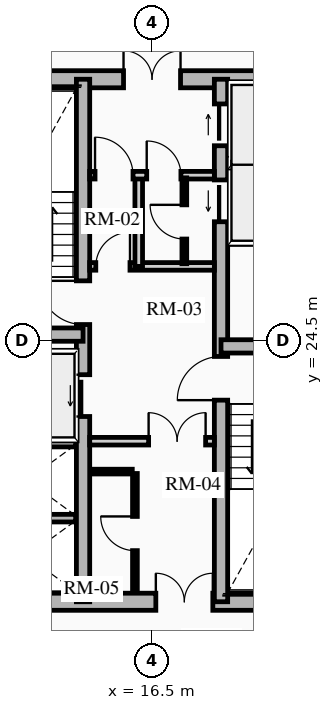
"""IFC4 building model, lengths in metres.
Left out: names, types, materials, properties, quantities, classifications, styles, units other than length and angle.
Written with IfcOpenShell. Run it as: python <this file> out.ifc"""

import sys

from ifc_helpers import new_model, si_unit, direction, frame, frame_2d, origin, place, context, subcontext, project, spatial, rectangle, extrude, source, transform, mapped, element, fill, save


model = new_model("IFC4")
c1 = context("Model", 3, precision=1e-05, world=origin(), true_north=direction((0.0, 1.0)))
c2 = subcontext(c1, "Body", "Model", "MODEL_VIEW")
j1 = project(units=[si_unit("LENGTHUNIT", "METRE"), si_unit("PLANEANGLEUNIT", "RADIAN")], contexts=[c1])
p1 = place(None, origin())
s1 = spatial("IfcSite", under=j1, at=p1, CompositionType="ELEMENT")
p2 = place(p1, origin())
s2 = spatial("IfcBuilding", under=s1, at=p2, CompositionType="ELEMENT")
p3 = place(p2, frame((0.0, 0.0, 102.16)))
s3 = spatial("IfcBuildingStorey", under=s2, at=p3, CompositionType="ELEMENT", Elevation=102.16)
p4 = place(p3, frame((11.15, 17.625, 0.0), z_axis=(0.0, 0.0, 1.0), x_axis=(1.0, 0.0, 0.0)))
e1 = element("IfcWall", 1, at=p4, inside=s3, PredefinedType="SHEAR", context=c2, shape_type="SweptSolid", body=[
    extrude(rectangle(XDim=10.7, YDim=0.45, at=frame_2d((5.35, 0.0))), origin(), (0.0, 0.0, 1.0), 2.91),
])
m1 = source(origin(), c2, "Body", "SweptSolid", [
    extrude(rectangle(XDim=1.5, YDim=2.02, at=frame_2d((0.75, 1.01))), frame((0.0, 0.235, 0.0), z_axis=(0.0, -1.0, 0.0), x_axis=(1.0, 0.0, 0.0)), (0.0, 0.0, 1.0), 0.47),
])
p5 = place(p4, frame((5.45, 0.0, 0.0)))
e2 = element("IfcOpeningElement", 2, at=p5, cuts=e1, PredefinedType="OPENING", context=c2, shape_type="MappedRepresentation", body=[
    mapped(m1, transform((0.0, 0.0, 0.0), x_axis=(1.0, 0.0, 0.0), y_axis=(0.0, 1.0, 0.0), z_axis=(0.0, 0.0, 1.0), scale=1.0)),
])
p6 = place(p3, frame((11.15, 31.375, 0.0), z_axis=(0.0, 0.0, 1.0), x_axis=(1.0, 0.0, 0.0)))
e3 = element("IfcWall", 3, at=p6, inside=s3, PredefinedType="SHEAR", context=c2, shape_type="SweptSolid", body=[
    extrude(rectangle(XDim=10.7, YDim=0.45, at=frame_2d((5.35, 0.0))), origin(), (0.0, 0.0, 1.0), 2.91),
])
p7 = place(p6, frame((4.6, 0.0, 0.0)))
e4 = element("IfcOpeningElement", 4, at=p7, cuts=e3, PredefinedType="OPENING", context=c2, shape_type="MappedRepresentation", body=[
    mapped(m1, transform((0.0, 0.0, 0.0), x_axis=(1.0, 0.0, 0.0), y_axis=(0.0, 1.0, 0.0), z_axis=(0.0, 0.0, 1.0), scale=1.0)),
])
p8 = place(p3, frame((14.685, 17.625, 0.0), z_axis=(0.0, 0.0, 1.0), x_axis=(0.0, 1.0, 0.0)))
e5 = element("IfcWall", 5, at=p8, inside=s3, PredefinedType="SHEAR", context=c2, shape_type="SweptSolid", body=[
    extrude(rectangle(XDim=13.75, YDim=0.35, at=frame_2d((6.875, 0.0))), origin(), (0.0, 0.0, 1.0), 2.91),
])
m2 = source(origin(), c2, "Body", "SweptSolid", [
    extrude(rectangle(XDim=1.1, YDim=2.015, at=frame_2d((0.55, 1.007))), frame((0.0, 0.185, 0.0), z_axis=(0.0, -1.0, 0.0), x_axis=(1.0, 0.0, 0.0)), (0.0, 0.0, 1.0), 0.37),
])
p9 = place(p8, frame((4.875, 0.0, 0.0)))
e6 = element("IfcOpeningElement", 6, at=p9, cuts=e5, PredefinedType="OPENING", context=c2, shape_type="MappedRepresentation", body=[
    mapped(m2, transform((0.0, 0.0, 0.0), x_axis=(1.0, 0.0, 0.0), y_axis=(0.0, 1.0, 0.0), z_axis=(0.0, 0.0, 1.0), scale=1.0)),
])
m3 = source(origin(), c2, "Body", "SweptSolid", [
    extrude(rectangle(XDim=1.15, YDim=2.02, at=frame_2d((0.575, 1.01))), frame((0.0, 0.185, 0.0), z_axis=(0.0, -1.0, 0.0), x_axis=(1.0, 0.0, 0.0)), (0.0, 0.0, 1.0), 0.37),
])
p10 = place(p8, frame((7.295, 0.0, 0.0)))
e7 = element("IfcOpeningElement", 7, at=p10, cuts=e5, PredefinedType="OPENING", context=c2, shape_type="MappedRepresentation", body=[
    mapped(m3, transform((0.0, 0.0, 0.0), x_axis=(1.0, 0.0, 0.0), y_axis=(0.0, 1.0, 0.0), z_axis=(0.0, 0.0, 1.0), scale=1.0)),
])
p11 = place(p3, frame((18.315, 17.625, 0.0), z_axis=(0.0, 0.0, 1.0), x_axis=(0.0, 1.0, 0.0)))
e8 = element("IfcWall", 8, at=p11, inside=s3, PredefinedType="SHEAR", context=c2, shape_type="SweptSolid", body=[
    extrude(rectangle(XDim=13.75, YDim=0.35, at=frame_2d((6.875, 0.0))), origin(), (0.0, 0.0, 1.0), 2.91),
])
p12 = place(p11, frame((10.0, 0.0, 0.0)))
e9 = element("IfcOpeningElement", 9, at=p12, cuts=e8, PredefinedType="OPENING", context=c2, shape_type="MappedRepresentation", body=[
    mapped(m2, transform((0.0, 0.0, 0.0), x_axis=(1.0, 0.0, 0.0), y_axis=(0.0, 1.0, 0.0), z_axis=(0.0, 0.0, 1.0), scale=1.0)),
])
p13 = place(p11, frame((12.0, 0.0, 0.0)))
e10 = element("IfcOpeningElement", 10, at=p13, cuts=e8, PredefinedType="OPENING", context=c2, shape_type="MappedRepresentation", body=[
    mapped(m2, transform((0.0, 0.0, 0.0), x_axis=(1.0, 0.0, 0.0), y_axis=(0.0, 1.0, 0.0), z_axis=(0.0, 0.0, 1.0), scale=1.0)),
])
p14 = place(p11, frame((5.305, 0.0, 0.0)))
e11 = element("IfcOpeningElement", 11, at=p14, cuts=e8, PredefinedType="OPENING", context=c2, shape_type="MappedRepresentation", body=[
    mapped(m3, transform((0.0, 0.0, 0.0), x_axis=(1.0, 0.0, 0.0), y_axis=(0.0, 1.0, 0.0), z_axis=(0.0, 0.0, 1.0), scale=1.0)),
])
for number, where, z_axis, x_axis in (
    (12, (11.4, 24.655, 0.0), (0.0, 0.0, 1.0), (1.0, 0.0, 0.0)),
    (13, (18.315, 24.345, 0.0), (0.0, 0.0, 1.0), (1.0, 0.0, 0.0)),
):
    element("IfcWall", number, at=place(p3, frame(where, z_axis=z_axis, x_axis=x_axis)), inside=s3, PredefinedType="SHEAR", context=c2, shape_type="SweptSolid", body=[
        extrude(rectangle(XDim=3.285, YDim=0.35, at=frame_2d((1.643, 0.0))), origin(), (0.0, 0.0, 1.0), 2.91),
    ])
for number, where, z_axis, x_axis in (
    (14, (11.52, 21.8, 0.0), (0.0, 0.0, 1.0), (1.0, 0.0, 0.0)),
    (15, (11.52, 19.825, 0.0), (0.0, 0.0, 1.0), (1.0, 0.0, 0.0)),
    (16, (18.51, 27.13, 0.0), (0.0, 0.0, 1.0), (1.0, 0.0, 0.0)),
    (17, (18.51, 29.175, 0.0), (0.0, 0.0, 1.0), (1.0, 0.0, 0.0)),
):
    element("IfcWall", number, at=place(p3, frame(where, z_axis=z_axis, x_axis=x_axis)), inside=s3, PredefinedType="SHEAR", context=c2, shape_type="SweptSolid", body=[
        extrude(rectangle(XDim=2.97, YDim=0.2, at=frame_2d((1.485, 0.0))), origin(), (0.0, 0.0, 1.0), 2.91),
    ])
p15 = place(p3, frame((14.86, 21.85, 0.0), z_axis=(0.0, 0.0, 1.0), x_axis=(1.0, 0.0, 0.0)))
e18 = element("IfcWall", 18, at=p15, inside=s3, PredefinedType="PARTITIONING", context=c2, shape_type="SweptSolid", body=[
    extrude(rectangle(XDim=3.28, YDim=0.2, at=frame_2d((1.64, 0.0))), origin(), (0.0, 0.0, 1.0), 2.655),
])
m4 = source(origin(), c2, "Body", "SweptSolid", [
    extrude(rectangle(XDim=1.5, YDim=2.02, at=frame_2d((0.75, 1.01))), frame((0.0, 0.11, 0.0), z_axis=(0.0, -1.0, 0.0), x_axis=(1.0, 0.0, 0.0)), (0.0, 0.0, 1.0), 0.22),
])
p16 = place(p15, frame((1.55, 0.0, 0.0)))
e19 = element("IfcOpeningElement", 19, at=p16, cuts=e18, PredefinedType="OPENING", context=c2, shape_type="MappedRepresentation", body=[
    mapped(m4, transform((0.0, 0.0, 0.0), x_axis=(1.0, 0.0, 0.0), y_axis=(0.0, 1.0, 0.0), z_axis=(0.0, 0.0, 1.0), scale=1.0)),
])
p17 = place(p3, frame((14.86, 26.45, 0.0), z_axis=(0.0, 0.0, 1.0), x_axis=(1.0, 0.0, 0.0)))
e20 = element("IfcWall", 20, at=p17, inside=s3, PredefinedType="PARTITIONING", context=c2, shape_type="SweptSolid", body=[
    extrude(rectangle(XDim=3.28, YDim=0.2, at=frame_2d((1.64, 0.0))), origin(), (0.0, 0.0, 1.0), 2.655),
])
m5 = source(origin(), c2, "Body", "SweptSolid", [
    extrude(rectangle(XDim=0.9, YDim=2.005, at=frame_2d((0.45, 1.002))), frame((0.0, 0.11, 0.0), z_axis=(0.0, -1.0, 0.0), x_axis=(1.0, 0.0, 0.0)), (0.0, 0.0, 1.0), 0.22),
])
p18 = place(p17, frame((0.16, 0.0, 0.0)))
e21 = element("IfcOpeningElement", 21, at=p18, cuts=e20, PredefinedType="OPENING", context=c2, shape_type="MappedRepresentation", body=[
    mapped(m5, transform((0.0, 0.0, 0.0), x_axis=(1.0, 0.0, 0.0), y_axis=(0.0, 1.0, 0.0), z_axis=(0.0, 0.0, 1.0), scale=1.0)),
])
p19 = place(p3, frame((16.15, 26.45, 0.0), z_axis=(0.0, 0.0, 1.0), x_axis=(0.0, 1.0, 0.0)))
e22 = element("IfcWall", 22, at=p19, inside=s3, PredefinedType="PARTITIONING", context=c2, shape_type="SweptSolid", body=[
    extrude(rectangle(XDim=2.4, YDim=0.2, at=frame_2d((1.2, 0.0))), origin(), (0.0, 0.0, 1.0), 2.655),
])
p20 = place(p3, frame((14.86, 28.85, 0.0), z_axis=(0.0, 0.0, 1.0), x_axis=(1.0, 0.0, 0.0)))
e23 = element("IfcWall", 23, at=p20, inside=s3, PredefinedType="PARTITIONING", context=c2, shape_type="SweptSolid", body=[
    extrude(rectangle(XDim=3.28, YDim=0.2, at=frame_2d((1.64, 0.0))), origin(), (0.0, 0.0, 1.0), 2.655),
])
m6 = source(origin(), c2, "Body", "SweptSolid", [
    extrude(rectangle(XDim=1.0, YDim=2.015, at=frame_2d((0.5, 1.007))), frame((0.0, 0.11, 0.0), z_axis=(0.0, -1.0, 0.0), x_axis=(1.0, 0.0, 0.0)), (0.0, 0.0, 1.0), 0.22),
])
p21 = place(p20, frame((0.14, 0.0, 0.0)))
e24 = element("IfcOpeningElement", 24, at=p21, cuts=e23, PredefinedType="OPENING", context=c2, shape_type="MappedRepresentation", body=[
    mapped(m6, transform((0.0, 0.0, 0.0), x_axis=(1.0, 0.0, 0.0), y_axis=(0.0, 1.0, 0.0), z_axis=(0.0, 0.0, 1.0), scale=1.0)),
])
p22 = place(p20, frame((1.5, 0.0, 0.0)))
e25 = element("IfcOpeningElement", 25, at=p22, cuts=e23, PredefinedType="OPENING", context=c2, shape_type="MappedRepresentation", body=[
    mapped(m5, transform((0.0, 0.0, 0.0), x_axis=(1.0, 0.0, 0.0), y_axis=(0.0, 1.0, 0.0), z_axis=(0.0, 0.0, 1.0), scale=1.0)),
])
p23 = place(p3, frame((16.05, 17.92, 0.0), z_axis=(0.0, 0.0, 1.0), x_axis=(0.0, 1.0, 0.0)))
e26 = element("IfcWall", 26, at=p23, inside=s3, PredefinedType="PARTITIONING", context=c2, shape_type="SweptSolid", body=[
    extrude(rectangle(XDim=3.08, YDim=0.125, at=frame_2d((1.54, 0.0))), origin(), (0.0, 0.0, 1.0), 2.655),
])
m7 = source(origin(), c2, "Body", "SweptSolid", [
    extrude(rectangle(XDim=0.9, YDim=2.005, at=frame_2d((0.45, 1.002))), frame((0.0, 0.073, 0.0), z_axis=(0.0, -1.0, 0.0), x_axis=(1.0, 0.0, 0.0)), (0.0, 0.0, 1.0), 0.145),
])
p24 = place(p23, frame((1.05, 0.0, 0.0)))
e27 = element("IfcOpeningElement", 27, at=p24, cuts=e26, PredefinedType="OPENING", context=c2, shape_type="MappedRepresentation", body=[
    mapped(m7, transform((0.0, 0.0, 0.0), x_axis=(1.0, 0.0, 0.0), y_axis=(0.0, 1.0, 0.0), z_axis=(0.0, 0.0, 1.0), scale=1.0)),
])
p25 = place(p3, frame((14.88, 21.05, 0.0), z_axis=(0.0, 0.0, 1.0), x_axis=(1.0, 0.0, 0.0)))
e28 = element("IfcWall", 28, at=p25, inside=s3, PredefinedType="PARTITIONING", context=c2, shape_type="SweptSolid", body=[
    extrude(rectangle(XDim=1.1, YDim=0.125, at=frame_2d((0.55, 0.0))), origin(), (0.0, 0.0, 1.0), 2.655),
])
p26 = place(p3, frame((17.35, 26.52, 0.0), z_axis=(0.0, 0.0, 1.0), x_axis=(0.0, 1.0, 0.0)))
e29 = element("IfcWall", 29, at=p26, inside=s3, PredefinedType="PARTITIONING", context=c2, shape_type="SweptSolid", body=[
    extrude(rectangle(XDim=2.26, YDim=0.125, at=frame_2d((1.13, 0.0))), origin(), (0.0, 0.0, 1.0), 2.655),
])
p27 = place(p26, frame((0.65, 0.0, 0.0)))
e30 = element("IfcOpeningElement", 30, at=p27, cuts=e29, PredefinedType="OPENING", context=c2, shape_type="MappedRepresentation", body=[
    mapped(m7, transform((0.0, 0.0, 0.0), x_axis=(1.0, 0.0, 0.0), y_axis=(0.0, 1.0, 0.0), z_axis=(0.0, 0.0, 1.0), scale=1.0)),
])
m8 = source(origin(), c2, "Body", "SweptSolid", [
    extrude(rectangle(XDim=1.1, YDim=2.015, at=frame_2d((0.55, 1.007))), frame((0.0, 0.025, 0.0), z_axis=(0.0, -1.0, 0.0), x_axis=(1.0, 0.0, 0.0)), (0.0, 0.0, 1.0), 0.05),
])
p28 = place(p9, origin())
e31 = element("IfcDoor", 31, at=p28, inside=s3, OperationType="SLIDING_TO_LEFT", PredefinedType="DOOR", context=c2, shape_type="MappedRepresentation", body=[
    mapped(m8, transform((0.0, 0.0, 0.0), x_axis=(1.0, 0.0, 0.0), y_axis=(0.0, 1.0, 0.0), z_axis=(0.0, 0.0, 1.0), scale=1.0)),
])
fill(e6, e31)
p29 = place(p12, origin())
e32 = element("IfcDoor", 32, at=p29, inside=s3, OperationType="SLIDING_TO_LEFT", PredefinedType="DOOR", context=c2, shape_type="MappedRepresentation", body=[
    mapped(m8, transform((0.0, 0.0, 0.0), x_axis=(1.0, 0.0, 0.0), y_axis=(0.0, 1.0, 0.0), z_axis=(0.0, 0.0, 1.0), scale=1.0)),
])
fill(e9, e32)
p30 = place(p13, origin())
e33 = element("IfcDoor", 33, at=p30, inside=s3, OperationType="SLIDING_TO_RIGHT", PredefinedType="DOOR", context=c2, shape_type="MappedRepresentation", body=[
    mapped(m8, transform((0.0, 0.0, 0.0), x_axis=(1.0, 0.0, 0.0), y_axis=(0.0, 1.0, 0.0), z_axis=(0.0, 0.0, 1.0), scale=1.0)),
])
fill(e10, e33)
m9 = source(origin(), c2, "Body", "SweptSolid", [
    extrude(rectangle(XDim=1.15, YDim=2.02, at=frame_2d((0.575, 1.01))), frame((0.0, 0.025, 0.0), z_axis=(0.0, -1.0, 0.0), x_axis=(1.0, 0.0, 0.0)), (0.0, 0.0, 1.0), 0.05),
])
p31 = place(p10, origin())
e34 = element("IfcDoor", 34, at=p31, inside=s3, OperationType="SINGLE_SWING_RIGHT", PredefinedType="DOOR", context=c2, shape_type="MappedRepresentation", body=[
    mapped(m9, transform((0.0, 0.0, 0.0), x_axis=(1.0, 0.0, 0.0), y_axis=(0.0, 1.0, 0.0), z_axis=(0.0, 0.0, 1.0), scale=1.0)),
])
fill(e7, e34)
p32 = place(p14, origin())
e35 = element("IfcDoor", 35, at=p32, inside=s3, OperationType="SINGLE_SWING_LEFT", PredefinedType="DOOR", context=c2, shape_type="MappedRepresentation", body=[
    mapped(m9, transform((0.0, 0.0, 0.0), x_axis=(1.0, 0.0, 0.0), y_axis=(0.0, 1.0, 0.0), z_axis=(0.0, 0.0, 1.0), scale=1.0)),
])
fill(e11, e35)
m10 = source(origin(), c2, "Body", "SweptSolid", [
    extrude(rectangle(XDim=1.5, YDim=2.02, at=frame_2d((0.75, 1.01))), frame((0.0, 0.025, 0.0), z_axis=(0.0, -1.0, 0.0), x_axis=(1.0, 0.0, 0.0)), (0.0, 0.0, 1.0), 0.05),
])
p33 = place(p7, origin())
e36 = element("IfcDoor", 36, at=p33, inside=s3, OperationType="DOUBLE_DOOR_SINGLE_SWING", PredefinedType="DOOR", context=c2, shape_type="MappedRepresentation", body=[
    mapped(m10, transform((0.0, 0.0, 0.0), x_axis=(1.0, 0.0, 0.0), y_axis=(0.0, 1.0, 0.0), z_axis=(0.0, 0.0, 1.0), scale=1.0)),
])
fill(e4, e36)
p34 = place(p5, origin())
e37 = element("IfcDoor", 37, at=p34, inside=s3, OperationType="DOUBLE_DOOR_SINGLE_SWING", PredefinedType="DOOR", context=c2, shape_type="MappedRepresentation", body=[
    mapped(m10, transform((0.0, 0.0, 0.0), x_axis=(1.0, 0.0, 0.0), y_axis=(0.0, 1.0, 0.0), z_axis=(0.0, 0.0, 1.0), scale=1.0)),
])
fill(e2, e37)
p35 = place(p16, origin())
e38 = element("IfcDoor", 38, at=p35, inside=s3, OperationType="DOUBLE_DOOR_SINGLE_SWING", PredefinedType="DOOR", context=c2, shape_type="MappedRepresentation", body=[
    mapped(m10, transform((0.0, 0.0, 0.0), x_axis=(1.0, 0.0, 0.0), y_axis=(0.0, 1.0, 0.0), z_axis=(0.0, 0.0, 1.0), scale=1.0)),
])
fill(e19, e38)
m11 = source(origin(), c2, "Body", "SweptSolid", [
    extrude(rectangle(XDim=0.9, YDim=2.005, at=frame_2d((0.45, 1.002))), frame((0.0, 0.025, 0.0), z_axis=(0.0, -1.0, 0.0), x_axis=(1.0, 0.0, 0.0)), (0.0, 0.0, 1.0), 0.05),
])
p36 = place(p18, origin())
e39 = element("IfcDoor", 39, at=p36, inside=s3, OperationType="SINGLE_SWING_RIGHT", PredefinedType="DOOR", context=c2, shape_type="MappedRepresentation", body=[
    mapped(m11, transform((0.0, 0.0, 0.0), x_axis=(1.0, 0.0, 0.0), y_axis=(0.0, 1.0, 0.0), z_axis=(0.0, 0.0, 1.0), scale=1.0)),
])
fill(e21, e39)
m12 = source(origin(), c2, "Body", "SweptSolid", [
    extrude(rectangle(XDim=1.0, YDim=2.015, at=frame_2d((0.5, 1.007))), frame((0.0, 0.025, 0.0), z_axis=(0.0, -1.0, 0.0), x_axis=(1.0, 0.0, 0.0)), (0.0, 0.0, 1.0), 0.05),
])
p37 = place(p21, origin())
e40 = element("IfcDoor", 40, at=p37, inside=s3, OperationType="SINGLE_SWING_LEFT", PredefinedType="DOOR", context=c2, shape_type="MappedRepresentation", body=[
    mapped(m12, transform((0.0, 0.0, 0.0), x_axis=(1.0, 0.0, 0.0), y_axis=(0.0, 1.0, 0.0), z_axis=(0.0, 0.0, 1.0), scale=1.0)),
])
fill(e24, e40)
p38 = place(p24, origin())
e41 = element("IfcDoor", 41, at=p38, inside=s3, OperationType="SINGLE_SWING_RIGHT", PredefinedType="DOOR", context=c2, shape_type="MappedRepresentation", body=[
    mapped(m11, transform((0.0, 0.0, 0.0), x_axis=(1.0, 0.0, 0.0), y_axis=(0.0, 1.0, 0.0), z_axis=(0.0, 0.0, 1.0), scale=1.0)),
])
fill(e27, e41)
p39 = place(p22, origin())
e42 = element("IfcDoor", 42, at=p39, inside=s3, OperationType="SINGLE_SWING_LEFT", PredefinedType="DOOR", context=c2, shape_type="MappedRepresentation", body=[
    mapped(m11, transform((0.0, 0.0, 0.0), x_axis=(1.0, 0.0, 0.0), y_axis=(0.0, 1.0, 0.0), z_axis=(0.0, 0.0, 1.0), scale=1.0)),
])
fill(e25, e42)
p40 = place(p27, origin())
e43 = element("IfcDoor", 43, at=p40, inside=s3, OperationType="SINGLE_SWING_RIGHT", PredefinedType="DOOR", context=c2, shape_type="MappedRepresentation", body=[
    mapped(m11, transform((0.0, 0.0, 0.0), x_axis=(1.0, 0.0, 0.0), y_axis=(0.0, 1.0, 0.0), z_axis=(0.0, 0.0, 1.0), scale=1.0)),
])
fill(e30, e43)
save(model, sys.argv[1])
